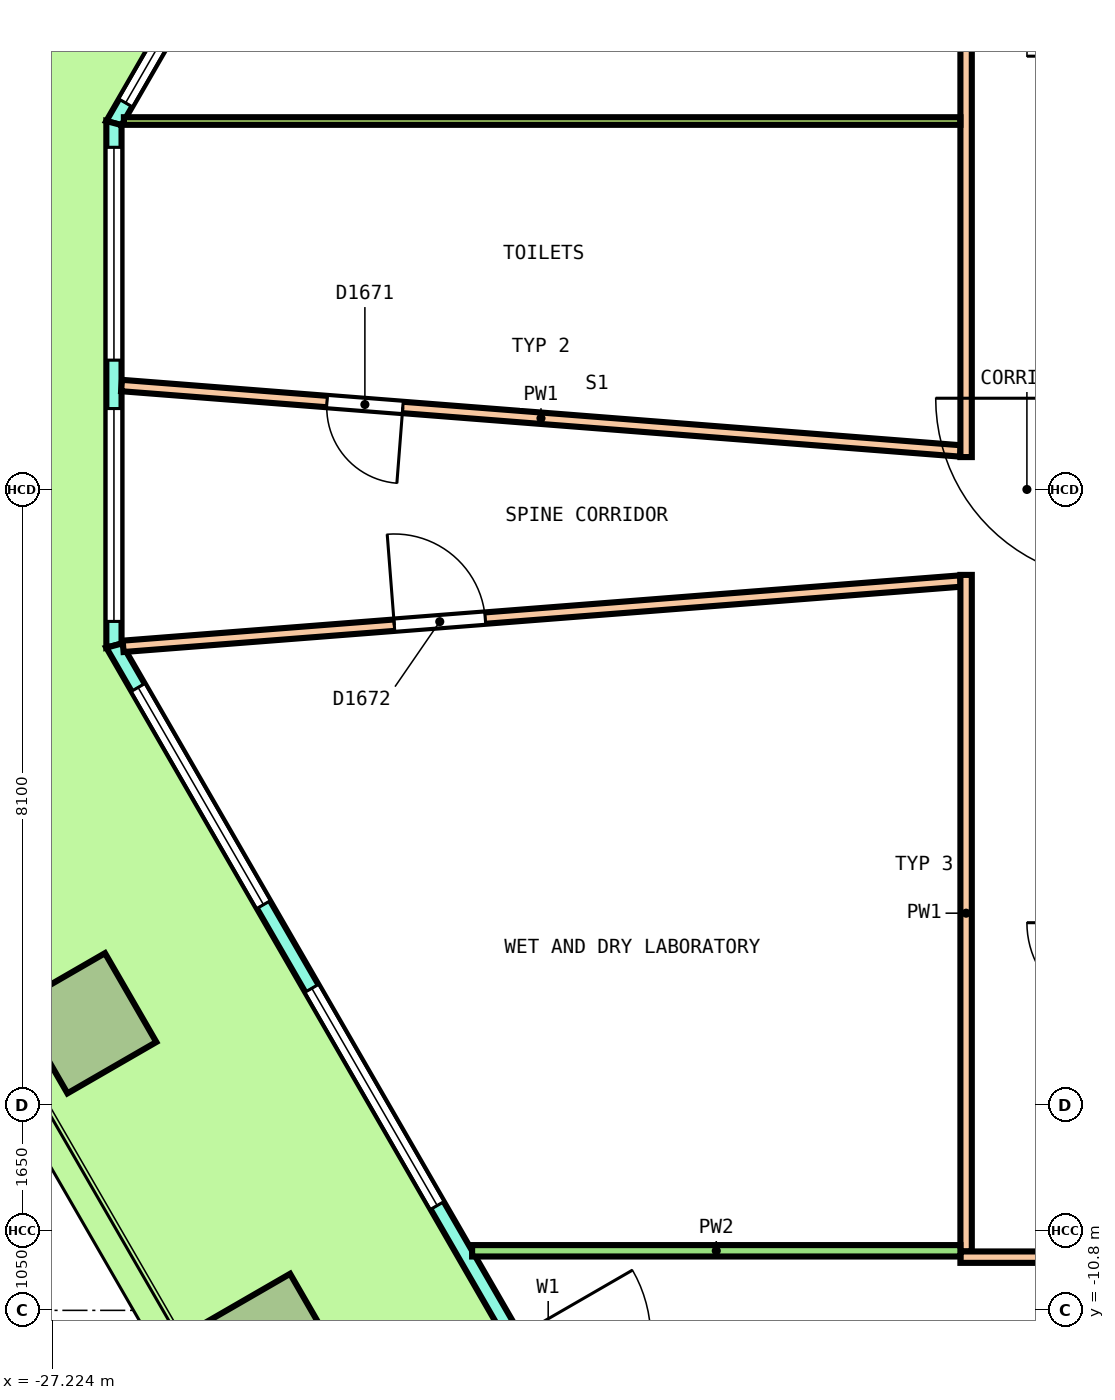
"""IFC4 building model, lengths in metres.
Left out: names, types, materials, properties, quantities, classifications, styles, units other than length and angle.
Written with IfcOpenShell. Run it as: python <this file> out.ifc"""

import sys

from ifc_helpers import new_model, si_unit, direction, frame, frame_2d, origin, origin_2d, place, context, subcontext, project, spatial, polyline, rectangle, outline, extrude, element, fill, save


model = new_model("IFC4")
c1 = context("Model", 3, precision=1e-05, world=origin(), true_north=direction((0.0, 1.0)))
c2 = subcontext(c1, "Body", "Model", "MODEL_VIEW")
j1 = project(units=[si_unit("LENGTHUNIT", "METRE"), si_unit("PLANEANGLEUNIT", "RADIAN")], contexts=[c1])
p1 = place(None, origin())
s1 = spatial("IfcSite", under=j1, at=p1, CompositionType="ELEMENT")
p2 = place(p1, origin())
s2 = spatial("IfcBuilding", under=s1, at=p2, CompositionType="ELEMENT")
p3 = place(p2, frame((0.0, 0.0, 130.8)))
s3 = spatial("IfcBuildingStorey", under=s2, at=p3, CompositionType="ELEMENT", Elevation=130.8)
p4 = place(p3, frame((-26.776, -7.023, 0.0), z_axis=(0.0, 0.0, 1.0), x_axis=(0.5, -0.866025403784, 0.0)))
e1 = element("IfcColumn", 1, at=p4, inside=s3, PredefinedType="COLUMN", context=c2, shape_type="SweptSolid", body=[
    extrude(rectangle(XDim=1.35, YDim=1.35, at=origin_2d()), origin(), (0.0, 0.0, 1.0), 4.04),
])
p5 = place(p3, frame((-24.341, -11.241, 0.0), z_axis=(0.0, 0.0, 1.0), x_axis=(0.5, -0.866025403784, 0.0)))
e2 = element("IfcColumn", 2, at=p5, inside=s3, PredefinedType="COLUMN", context=c2, shape_type="SweptSolid", body=[
    extrude(rectangle(XDim=1.35, YDim=1.35, at=origin_2d()), origin(), (0.0, 0.0, 1.0), 4.05),
])
p6 = place(p3, frame((-17.38, 20.463, 0.0), z_axis=(0.0, 0.0, 1.0), x_axis=(-0.500000137386, -0.866025324465, 0.0)))
e3 = element("IfcWall", 3, at=p6, inside=s3, PredefinedType="SOLIDWALL", context=c2, shape_type="SweptSolid", body=[
    extrude(outline(polyline([(-0.027, -0.1), (0.979, -0.1), (1.986, -0.1), (2.992, -0.1), (3.999, -0.1), (5.005, -0.1), (6.012, -0.1), (7.018, -0.1), (8.025, -0.1), (9.031, -0.1), (10.038, -0.1), (11.044, -0.1), (12.051, -0.1), (13.057, -0.1), (14.063, -0.1), (15.07, -0.1), (16.076, -0.1), (17.083, -0.1), (18.089, -0.1), (18.036, 0.1), (17.035, 0.1), (16.035, 0.1), (15.034, 0.1), (14.034, 0.1), (13.033, 0.1), (12.033, 0.1), (11.032, 0.1), (10.032, 0.1), (9.031, 0.1), (8.031, 0.1), (7.03, 0.1), (6.03, 0.1), (5.029, 0.1), (4.029, 0.1), (3.028, 0.1), (2.028, 0.1), (1.027, 0.1), (0.027, 0.1), (-0.027, -0.1)])), origin(), (0.0, 0.0, 1.0), 4.1),
])
p7 = place(p6, frame((0.306, 0.0, 0.1)))
e4 = element("IfcOpeningElement", 4, at=p7, cuts=e3, PredefinedType="OPENING", context=c2, shape_type="SweptSolid", body=[
    extrude(rectangle(XDim=3.0, YDim=2.9, at=frame_2d((1.5, 1.45))), frame((0.0, 0.11, 0.0), z_axis=(0.0, -1.0, 0.0), x_axis=(1.0, 0.0, 0.0)), (0.0, 0.0, 1.0), 0.22),
])
p8 = place(p6, frame((3.919, 0.0, 0.1)))
e5 = element("IfcOpeningElement", 5, at=p8, cuts=e3, PredefinedType="OPENING", context=c2, shape_type="SweptSolid", body=[
    extrude(rectangle(XDim=3.0, YDim=2.9, at=frame_2d((1.5, 1.45))), frame((0.0, 0.11, 0.0), z_axis=(0.0, -1.0, 0.0), x_axis=(1.0, 0.0, 0.0)), (0.0, 0.0, 1.0), 0.22),
])
p9 = place(p6, frame((8.131, 0.0, 0.0)))
e6 = element("IfcOpeningElement", 6, at=p9, cuts=e3, PredefinedType="OPENING", context=c2, shape_type="SweptSolid", body=[
    extrude(rectangle(XDim=1.8, YDim=2.4, at=frame_2d((0.9, 1.2))), frame((0.0, 0.11, 0.0), z_axis=(0.0, -1.0, 0.0), x_axis=(1.0, 0.0, 0.0)), (0.0, 0.0, 1.0), 0.22),
])
p10 = place(p6, frame((8.131, 0.0, 2.55)))
e7 = element("IfcOpeningElement", 7, at=p10, cuts=e3, PredefinedType="OPENING", context=c2, shape_type="SweptSolid", body=[
    extrude(rectangle(XDim=1.8, YDim=0.45, at=frame_2d((0.9, 0.225))), frame((0.0, 0.11, 0.0), z_axis=(0.0, -1.0, 0.0), x_axis=(1.0, 0.0, 0.0)), (0.0, 0.0, 1.0), 0.22),
])
p11 = place(p6, frame((11.144, 0.0, 0.1)))
e8 = element("IfcOpeningElement", 8, at=p11, cuts=e3, PredefinedType="OPENING", context=c2, shape_type="SweptSolid", body=[
    extrude(rectangle(XDim=3.0, YDim=2.9, at=frame_2d((1.5, 1.45))), frame((0.0, 0.11, 0.0), z_axis=(0.0, -1.0, 0.0), x_axis=(1.0, 0.0, 0.0)), (0.0, 0.0, 1.0), 0.22),
])
p12 = place(p6, frame((14.756, 0.0, 0.1)))
e9 = element("IfcOpeningElement", 9, at=p12, cuts=e3, PredefinedType="OPENING", context=c2, shape_type="SweptSolid", body=[
    extrude(rectangle(XDim=3.0, YDim=2.9, at=frame_2d((1.5, 1.45))), frame((0.0, 0.11, 0.0), z_axis=(0.0, -1.0, 0.0), x_axis=(1.0, 0.0, 0.0)), (0.0, 0.0, 1.0), 0.22),
])
p13 = place(p3, frame((-26.411, 4.82, 0.0), z_axis=(0.0, 0.0, 1.0), x_axis=(0.0, -1.0, 0.0)))
e10 = element("IfcWall", 10, at=p13, inside=s3, PredefinedType="SOLIDWALL", context=c2, shape_type="SweptSolid", body=[
    extrude(outline(polyline([(-0.027, -0.1), (1.128, -0.1), (2.283, -0.1), (3.438, -0.1), (4.592, -0.1), (5.747, -0.1), (6.902, -0.1), (6.848, 0.1), (5.711, 0.1), (4.574, 0.1), (3.438, 0.1), (2.301, 0.1), (1.164, 0.1), (0.027, 0.1), (-0.027, -0.1)])), origin(), (0.0, 0.0, 1.0), 4.1),
])
p14 = place(p13, frame((0.319, 0.0, 0.1)))
e11 = element("IfcOpeningElement", 11, at=p14, cuts=e10, PredefinedType="OPENING", context=c2, shape_type="SweptSolid", body=[
    extrude(rectangle(XDim=2.8, YDim=2.9, at=frame_2d((1.4, 1.45))), frame((0.0, 0.11, 0.0), z_axis=(0.0, -1.0, 0.0), x_axis=(1.0, 0.0, 0.0)), (0.0, 0.0, 1.0), 0.22),
])
p15 = place(p13, frame((3.756, 0.0, 0.1)))
e12 = element("IfcOpeningElement", 12, at=p15, cuts=e10, PredefinedType="OPENING", context=c2, shape_type="SweptSolid", body=[
    extrude(rectangle(XDim=2.8, YDim=2.9, at=frame_2d((1.4, 1.45))), frame((0.0, 0.11, 0.0), z_axis=(0.0, -1.0, 0.0), x_axis=(1.0, 0.0, 0.0)), (0.0, 0.0, 1.0), 0.22),
])
p16 = place(p3, frame((-26.411, -2.055, 0.0), z_axis=(0.0, 0.0, 1.0), x_axis=(0.50000204422, -0.86602422355, 0.0)))
e13 = element("IfcWall", 13, at=p16, inside=s3, PredefinedType="SOLIDWALL", context=c2, shape_type="SweptSolid", body=[
    extrude(outline(polyline([(-0.027, -0.1), (1.014, -0.1), (2.055, -0.1), (3.097, -0.1), (4.138, -0.1), (5.179, -0.1), (6.22, -0.1), (7.261, -0.1), (8.303, -0.1), (9.344, -0.1), (10.385, -0.1), (11.426, -0.1), (12.468, -0.1), (13.509, -0.1), (14.55, -0.1), (15.591, -0.1), (16.632, -0.1), (17.673, -0.1), (18.715, -0.1), (19.756, -0.1), (20.797, -0.1), (21.838, -0.1), (22.879, -0.1), (22.826, 0.1), (21.789, 0.1), (20.753, 0.1), (19.717, 0.1), (18.68, 0.1), (17.644, 0.1), (16.608, 0.1), (15.572, 0.1), (14.535, 0.1), (13.499, 0.1), (12.463, 0.1), (11.426, 0.1), (10.39, 0.1), (9.354, 0.1), (8.317, 0.1), (7.281, 0.1), (6.245, 0.1), (5.208, 0.1), (4.172, 0.1), (3.136, 0.1), (2.099, 0.1), (1.063, 0.1), (0.027, 0.1), (-0.027, -0.1)])), origin(), (0.0, 0.0, 1.0), 4.1),
])
p17 = place(p16, frame((0.635, 0.0, 0.1)))
e14 = element("IfcOpeningElement", 14, at=p17, cuts=e13, PredefinedType="OPENING", context=c2, shape_type="SweptSolid", body=[
    extrude(rectangle(XDim=3.3, YDim=2.9, at=frame_2d((1.65, 1.45))), frame((0.0, 0.11, 0.0), z_axis=(0.0, -1.0, 0.0), x_axis=(1.0, 0.0, 0.0)), (0.0, 0.0, 1.0), 0.22),
])
p18 = place(p16, frame((5.206, 0.0, 0.1)))
e15 = element("IfcOpeningElement", 15, at=p18, cuts=e13, PredefinedType="OPENING", context=c2, shape_type="SweptSolid", body=[
    extrude(rectangle(XDim=3.3, YDim=2.9, at=frame_2d((1.65, 1.45))), frame((0.0, 0.11, 0.0), z_axis=(0.0, -1.0, 0.0), x_axis=(1.0, 0.0, 0.0)), (0.0, 0.0, 1.0), 0.22),
])
p19 = place(p16, frame((10.526, 0.0, 0.0)))
e16 = element("IfcOpeningElement", 16, at=p19, cuts=e13, PredefinedType="OPENING", context=c2, shape_type="SweptSolid", body=[
    extrude(rectangle(XDim=1.8, YDim=2.4, at=frame_2d((0.9, 1.2))), frame((0.0, 0.11, 0.0), z_axis=(0.0, -1.0, 0.0), x_axis=(1.0, 0.0, 0.0)), (0.0, 0.0, 1.0), 0.22),
])
p20 = place(p16, frame((10.526, 0.0, 2.55)))
e17 = element("IfcOpeningElement", 17, at=p20, cuts=e13, PredefinedType="OPENING", context=c2, shape_type="SweptSolid", body=[
    extrude(rectangle(XDim=1.8, YDim=0.45, at=frame_2d((0.9, 0.225))), frame((0.0, 0.11, 0.0), z_axis=(0.0, -1.0, 0.0), x_axis=(1.0, 0.0, 0.0)), (0.0, 0.0, 1.0), 0.22),
])
p21 = place(p16, frame((14.347, 0.0, 0.1)))
e18 = element("IfcOpeningElement", 18, at=p21, cuts=e13, PredefinedType="OPENING", context=c2, shape_type="SweptSolid", body=[
    extrude(rectangle(XDim=3.3, YDim=2.9, at=frame_2d((1.65, 1.45))), frame((0.0, 0.11, 0.0), z_axis=(0.0, -1.0, 0.0), x_axis=(1.0, 0.0, 0.0)), (0.0, 0.0, 1.0), 0.22),
])
p22 = place(p16, frame((18.917, 0.0, 0.1)))
e19 = element("IfcOpeningElement", 19, at=p22, cuts=e13, PredefinedType="OPENING", context=c2, shape_type="SweptSolid", body=[
    extrude(rectangle(XDim=3.3, YDim=2.9, at=frame_2d((1.65, 1.45))), frame((0.0, 0.11, 0.0), z_axis=(0.0, -1.0, 0.0), x_axis=(1.0, 0.0, 0.0)), (0.0, 0.0, 1.0), 0.22),
])
p23 = place(p3, frame((-26.311, 1.367, 0.0), z_axis=(0.0, 0.0, 1.0), x_axis=(0.996973369859, -0.077743808706, 0.0)))
e20 = element("IfcWall", 20, at=p23, inside=s3, PredefinedType="PARTITIONING", context=c2, shape_type="SweptSolid", body=[
    extrude(rectangle(XDim=11.07, YDim=0.15, at=frame_2d((5.535, 0.0))), origin(), (0.0, 0.0, 1.0), 3.05),
])
p24 = place(p23, frame((2.711, 0.0, 0.0)))
e21 = element("IfcOpeningElement", 21, at=p24, cuts=e20, PredefinedType="OPENING", context=c2, shape_type="SweptSolid", body=[
    extrude(rectangle(XDim=1.0, YDim=2.1, at=frame_2d((0.5, 1.05))), frame((0.0, 0.085, 0.0), z_axis=(0.0, -1.0, 0.0), x_axis=(1.0, 0.0, 0.0)), (0.0, 0.0, 1.0), 0.17),
])
p25 = place(p3, frame((-26.29, -2.064, 0.0), z_axis=(0.0, 0.0, 1.0), x_axis=(0.99697229372, 0.077757607695, 0.0)))
e22 = element("IfcWall", 22, at=p25, inside=s3, PredefinedType="PARTITIONING", context=c2, shape_type="SweptSolid", body=[
    extrude(rectangle(XDim=11.049, YDim=0.15, at=frame_2d((5.524, 0.0))), origin(), (0.0, 0.0, 1.0), 3.05),
])
p26 = place(p25, frame((3.578, 0.0, 0.0)))
e23 = element("IfcOpeningElement", 23, at=p26, cuts=e22, PredefinedType="OPENING", context=c2, shape_type="SweptSolid", body=[
    extrude(rectangle(XDim=1.2, YDim=2.1, at=frame_2d((0.6, 1.05))), frame((0.0, 0.085, 0.0), z_axis=(0.0, -1.0, 0.0), x_axis=(1.0, 0.0, 0.0)), (0.0, 0.0, 1.0), 0.17),
])
p27 = place(p3, frame((-15.2, -10.025, 0.0), z_axis=(0.0, 0.0, 1.0), x_axis=(0.0, 1.0, 0.0)))
e24 = element("IfcWall", 24, at=p27, inside=s3, PredefinedType="PARTITIONING", context=c2, shape_type="SweptSolid", body=[
    extrude(rectangle(XDim=8.901, YDim=0.15, at=frame_2d((4.45, 0.0))), origin(), (0.0, 0.0, 1.0), 3.05),
])
p28 = place(p3, frame((-15.2, 0.426, 0.0), z_axis=(0.0, 0.0, 1.0), x_axis=(0.0, 1.0, 0.0)))
e25 = element("IfcWall", 25, at=p28, inside=s3, PredefinedType="PARTITIONING", context=c2, shape_type="SweptSolid", body=[
    extrude(rectangle(XDim=9.624, YDim=0.15, at=frame_2d((4.812, 0.0))), origin(), (0.0, 0.0, 1.0), 3.05),
])
p29 = place(p28, frame((6.951, 0.0, 0.0)))
e26 = element("IfcOpeningElement", 26, at=p29, cuts=e25, PredefinedType="OPENING", context=c2, shape_type="SweptSolid", body=[
    extrude(rectangle(XDim=1.2, YDim=2.1, at=frame_2d((0.6, 1.05))), frame((0.0, 0.085, 0.0), z_axis=(0.0, -1.0, 0.0), x_axis=(1.0, 0.0, 0.0)), (0.0, 0.0, 1.0), 0.17),
])
p30 = place(p3, frame((-15.275, -10.1, 0.0), z_axis=(0.0, 0.0, 1.0), x_axis=(1.0, 0.0, 0.0)))
e27 = element("IfcWall", 27, at=p30, inside=s3, PredefinedType="PARTITIONING", context=c2, shape_type="SweptSolid", body=[
    extrude(rectangle(XDim=30.4, YDim=0.15, at=frame_2d((15.2, 0.0))), origin(), (0.0, 0.0, 1.0), 3.05),
])
p31 = place(p30, frame((1.506, 0.0, 0.0)))
e28 = element("IfcOpeningElement", 28, at=p31, cuts=e27, PredefinedType="OPENING", context=c2, shape_type="SweptSolid", body=[
    extrude(rectangle(XDim=1.0, YDim=2.1, at=frame_2d((0.5, 1.05))), frame((0.0, 0.085, 0.0), z_axis=(0.0, -1.0, 0.0), x_axis=(1.0, 0.0, 0.0)), (0.0, 0.0, 1.0), 0.17),
])
p32 = place(p30, frame((7.84, 0.0, 0.0)))
e29 = element("IfcOpeningElement", 29, at=p32, cuts=e27, PredefinedType="OPENING", context=c2, shape_type="SweptSolid", body=[
    extrude(rectangle(XDim=1.0, YDim=2.1, at=frame_2d((0.5, 1.05))), frame((0.0, 0.085, 0.0), z_axis=(0.0, -1.0, 0.0), x_axis=(1.0, 0.0, 0.0)), (0.0, 0.0, 1.0), 0.17),
])
p33 = place(p30, frame((15.685, 0.0, 0.0)))
e30 = element("IfcOpeningElement", 30, at=p33, cuts=e27, PredefinedType="OPENING", context=c2, shape_type="SweptSolid", body=[
    extrude(rectangle(XDim=1.2, YDim=2.1, at=frame_2d((0.6, 1.05))), frame((0.0, 0.085, 0.0), z_axis=(0.0, -1.0, 0.0), x_axis=(1.0, 0.0, 0.0)), (0.0, 0.0, 1.0), 0.17),
])
p34 = place(p30, frame((23.812, 0.0, 0.0)))
e31 = element("IfcOpeningElement", 31, at=p34, cuts=e27, PredefinedType="OPENING", context=c2, shape_type="SweptSolid", body=[
    extrude(rectangle(XDim=1.2, YDim=2.1, at=frame_2d((0.6, 1.05))), frame((0.0, 0.085, 0.0), z_axis=(0.0, -1.0, 0.0), x_axis=(1.0, 0.0, 0.0)), (0.0, 0.0, 1.0), 0.17),
])
p35 = place(p3, frame((-21.699, -10.016, 0.0), z_axis=(0.0, 0.0, 1.0), x_axis=(1.0, 0.0, 0.0)))
e32 = element("IfcWall", 32, at=p35, inside=s3, PredefinedType="PARTITIONING", context=c2, shape_type="SweptSolid", body=[
    extrude(rectangle(XDim=6.424, YDim=0.15, at=frame_2d((3.212, 0.0))), origin(), (0.0, 0.0, 1.0), 3.05),
])
p36 = place(p3, frame((-26.28, 4.847, 0.0), z_axis=(0.0, 0.0, 1.0), x_axis=(1.0, 0.0, 0.0)))
e33 = element("IfcWall", 33, at=p36, inside=s3, PredefinedType="PARTITIONING", context=c2, shape_type="SweptSolid", body=[
    extrude(rectangle(XDim=11.005, YDim=0.1, at=frame_2d((5.503, 0.0))), origin(), (0.0, 0.0, 1.0), 3.05),
])
p37 = place(p12, origin())
e34 = element("IfcWindow", 34, at=p37, inside=s3, PartitioningType="SINGLE_PANEL", PredefinedType="WINDOW", context=c2, shape_type="SweptSolid", body=[
    extrude(rectangle(XDim=3.0, YDim=2.9, at=frame_2d((1.5, 1.45))), frame((0.0, 0.03, 0.0), z_axis=(0.0, -1.0, 0.0), x_axis=(1.0, 0.0, 0.0)), (0.0, 0.0, 1.0), 0.06),
])
fill(e9, e34)
p38 = place(p14, origin())
e35 = element("IfcWindow", 35, at=p38, inside=s3, PartitioningType="SINGLE_PANEL", PredefinedType="WINDOW", context=c2, shape_type="SweptSolid", body=[
    extrude(rectangle(XDim=2.8, YDim=2.9, at=frame_2d((1.4, 1.45))), frame((0.0, 0.03, 0.0), z_axis=(0.0, -1.0, 0.0), x_axis=(1.0, 0.0, 0.0)), (0.0, 0.0, 1.0), 0.06),
])
fill(e11, e35)
p39 = place(p15, origin())
e36 = element("IfcWindow", 36, at=p39, inside=s3, PartitioningType="SINGLE_PANEL", PredefinedType="WINDOW", context=c2, shape_type="SweptSolid", body=[
    extrude(rectangle(XDim=2.8, YDim=2.9, at=frame_2d((1.4, 1.45))), frame((0.0, 0.03, 0.0), z_axis=(0.0, -1.0, 0.0), x_axis=(1.0, 0.0, 0.0)), (0.0, 0.0, 1.0), 0.06),
])
fill(e12, e36)
p40 = place(p17, origin())
e37 = element("IfcWindow", 37, at=p40, inside=s3, PartitioningType="SINGLE_PANEL", PredefinedType="WINDOW", context=c2, shape_type="SweptSolid", body=[
    extrude(rectangle(XDim=3.3, YDim=2.9, at=frame_2d((1.65, 1.45))), frame((0.0, 0.03, 0.0), z_axis=(0.0, -1.0, 0.0), x_axis=(1.0, 0.0, 0.0)), (0.0, 0.0, 1.0), 0.06),
])
fill(e14, e37)
p41 = place(p18, origin())
e38 = element("IfcWindow", 38, at=p41, inside=s3, PartitioningType="SINGLE_PANEL", PredefinedType="WINDOW", context=c2, shape_type="SweptSolid", body=[
    extrude(rectangle(XDim=3.3, YDim=2.9, at=frame_2d((1.65, 1.45))), frame((0.0, 0.03, 0.0), z_axis=(0.0, -1.0, 0.0), x_axis=(1.0, 0.0, 0.0)), (0.0, 0.0, 1.0), 0.06),
])
fill(e15, e38)
p42 = place(p24, origin())
e39 = element("IfcDoor", 39, at=p42, inside=s3, OperationType="SINGLE_SWING_LEFT", PredefinedType="DOOR", context=c2, shape_type="SweptSolid", body=[
    extrude(rectangle(XDim=1.0, YDim=2.1, at=frame_2d((0.5, 1.05))), frame((0.0, 0.025, 0.0), z_axis=(0.0, -1.0, 0.0), x_axis=(1.0, 0.0, 0.0)), (0.0, 0.0, 1.0), 0.05),
])
fill(e21, e39)
p43 = place(p26, origin())
e40 = element("IfcDoor", 40, at=p43, inside=s3, OperationType="DOUBLE_DOOR_SINGLE_SWING", PredefinedType="DOOR", context=c2, shape_type="SweptSolid", body=[
    extrude(rectangle(XDim=1.2, YDim=2.1, at=frame_2d((0.6, 1.05))), frame((0.0, 0.025, 0.0), z_axis=(0.0, -1.0, 0.0), x_axis=(1.0, 0.0, 0.0)), (0.0, 0.0, 1.0), 0.05),
])
fill(e23, e40)
save(model, sys.argv[1])
